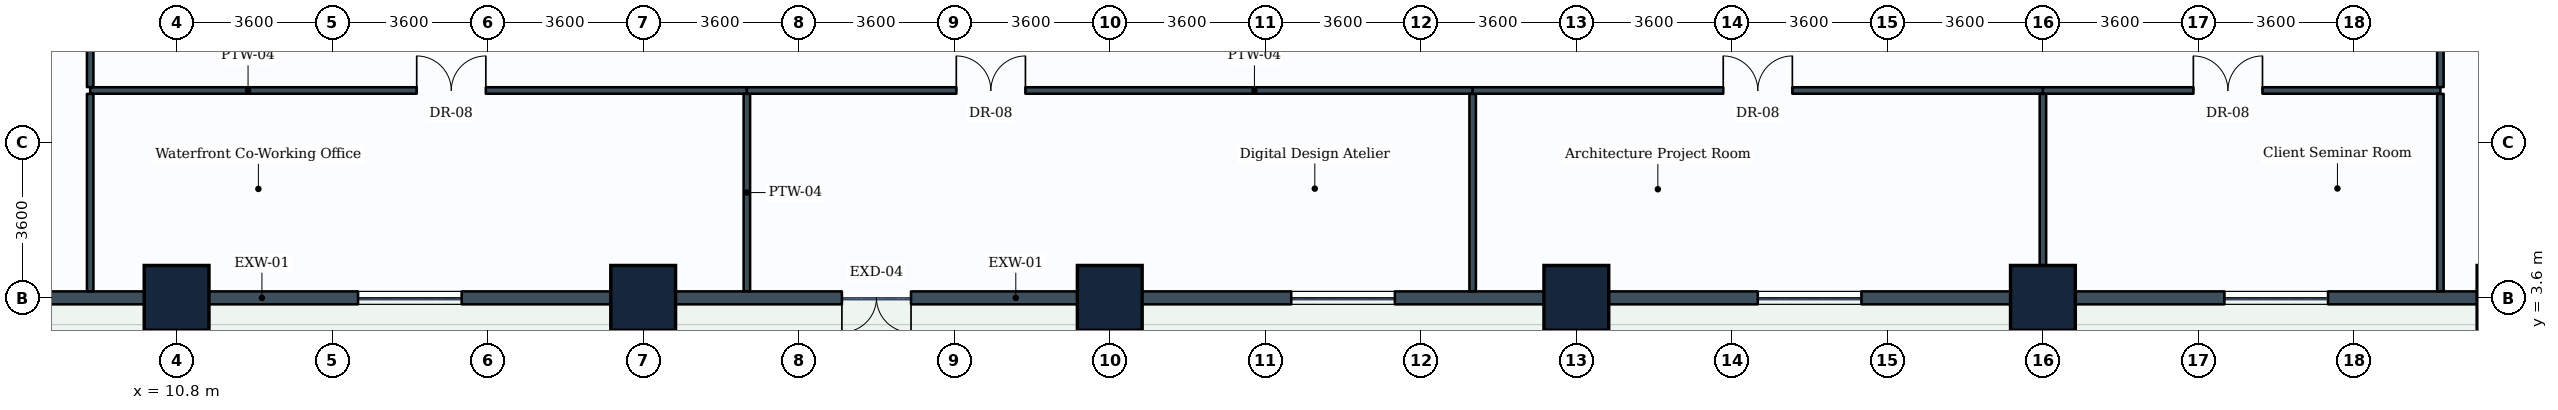
"""IFC4 building model, lengths in metres.
Left out: names, types, materials, properties, quantities, classifications, styles, units other than length and angle.
Written with IfcOpenShell. Run it as: python <this file> out.ifc"""

import sys

from ifc_helpers import new_model, si_unit, direction, frame, frame_2d, origin, origin_2d, place, context, subcontext, project, spatial, rectangle, extrude, element, fill, save


model = new_model("IFC4")
c1 = context("Model", 3, precision=1e-05, world=origin(), true_north=direction((0.0, 1.0)))
c2 = subcontext(c1, "Body", "Model", "MODEL_VIEW")
j1 = project(units=[si_unit("LENGTHUNIT", "METRE"), si_unit("PLANEANGLEUNIT", "RADIAN")], contexts=[c1])
p1 = place(None, origin())
s1 = spatial("IfcSite", under=j1, at=p1, CompositionType="ELEMENT")
p2 = place(p1, origin())
s2 = spatial("IfcBuilding", under=s1, at=p2, CompositionType="ELEMENT")
p3 = place(p2, frame((0.0, 0.0, 14.8)))
s3 = spatial("IfcBuildingStorey", under=s2, at=p3, CompositionType="ELEMENT", Elevation=14.8)
for number, where, z_axis, x_axis in (
    (1, (10.8, 3.6, 0.0), (0.0, 0.0, 1.0), (1.0, 0.0, 0.0)),
    (2, (21.6, 3.6, 0.0), (0.0, 0.0, 1.0), (1.0, 0.0, 0.0)),
    (3, (32.4, 3.6, 0.0), (0.0, 0.0, 1.0), (1.0, 0.0, 0.0)),
    (4, (43.2, 3.6, 0.0), (0.0, 0.0, 1.0), (1.0, 0.0, 0.0)),
    (5, (54.0, 3.6, 0.0), (0.0, 0.0, 1.0), (1.0, 0.0, 0.0)),
    (6, (64.8, 3.6, 0.0), (0.0, 0.0, 1.0), (1.0, 0.0, 0.0)),
):
    element("IfcColumn", number, at=place(p3, frame(where, z_axis=z_axis, x_axis=x_axis)), inside=s3, PredefinedType="COLUMN", context=c2, shape_type="SweptSolid", body=[
        extrude(rectangle(XDim=1.5, YDim=1.5, at=origin_2d()), origin(), (0.0, 0.0, 1.0), 4.6),
    ])
p4 = place(p3, frame((10.8, 3.6, 0.0), z_axis=(0.0, 0.0, 1.0), x_axis=(-1.0, 0.0, 0.0)))
e7 = element("IfcWall", 7, at=p4, inside=s3, PredefinedType="STANDARD", context=c2, shape_type="SweptSolid", body=[
    extrude(rectangle(XDim=10.8, YDim=0.3, at=frame_2d((5.4, 0.0))), origin(), (0.0, 0.0, 1.0), 3.63),
])
p5 = place(p4, frame((4.2, 0.0, 0.85)))
e8 = element("IfcOpeningElement", 8, at=p5, cuts=e7, PredefinedType="OPENING", context=c2, shape_type="SweptSolid", body=[
    extrude(rectangle(XDim=2.4, YDim=1.6, at=frame_2d((1.2, 0.8))), frame((0.0, 0.16, 0.0), z_axis=(0.0, -1.0, 0.0), x_axis=(1.0, 0.0, 0.0)), (0.0, 0.0, 1.0), 0.32),
])
p6 = place(p3, frame((21.6, 3.6, 0.0), z_axis=(0.0, 0.0, 1.0), x_axis=(-1.0, 0.0, 0.0)))
e9 = element("IfcWall", 9, at=p6, inside=s3, PredefinedType="STANDARD", context=c2, shape_type="SweptSolid", body=[
    extrude(rectangle(XDim=10.8, YDim=0.3, at=frame_2d((5.4, 0.0))), origin(), (0.0, 0.0, 1.0), 3.63),
])
p7 = place(p6, frame((4.2, 0.0, 0.85)))
e10 = element("IfcOpeningElement", 10, at=p7, cuts=e9, PredefinedType="OPENING", context=c2, shape_type="SweptSolid", body=[
    extrude(rectangle(XDim=2.4, YDim=1.6, at=frame_2d((1.2, 0.8))), frame((0.0, 0.16, 0.0), z_axis=(0.0, -1.0, 0.0), x_axis=(1.0, 0.0, 0.0)), (0.0, 0.0, 1.0), 0.32),
])
p8 = place(p3, frame((32.4, 3.6, 0.0), z_axis=(0.0, 0.0, 1.0), x_axis=(-1.0, 0.0, 0.0)))
e11 = element("IfcWall", 11, at=p8, inside=s3, PredefinedType="STANDARD", context=c2, shape_type="SweptSolid", body=[
    extrude(rectangle(XDim=10.8, YDim=0.3, at=frame_2d((5.4, 0.0))), origin(), (0.0, 0.0, 1.0), 3.63),
])
p9 = place(p8, frame((4.6, 0.0, 0.0)))
e12 = element("IfcOpeningElement", 12, at=p9, cuts=e11, PredefinedType="OPENING", context=c2, shape_type="SweptSolid", body=[
    extrude(rectangle(XDim=1.6, YDim=2.1, at=frame_2d((0.8, 1.05))), frame((0.0, 0.16, 0.0), z_axis=(0.0, -1.0, 0.0), x_axis=(1.0, 0.0, 0.0)), (0.0, 0.0, 1.0), 0.32),
])
p10 = place(p3, frame((43.2, 3.6, 0.0), z_axis=(0.0, 0.0, 1.0), x_axis=(-1.0, 0.0, 0.0)))
e13 = element("IfcWall", 13, at=p10, inside=s3, PredefinedType="STANDARD", context=c2, shape_type="SweptSolid", body=[
    extrude(rectangle(XDim=10.8, YDim=0.3, at=frame_2d((5.4, 0.0))), origin(), (0.0, 0.0, 1.0), 3.63),
])
p11 = place(p10, frame((4.2, 0.0, 0.85)))
e14 = element("IfcOpeningElement", 14, at=p11, cuts=e13, PredefinedType="OPENING", context=c2, shape_type="SweptSolid", body=[
    extrude(rectangle(XDim=2.4, YDim=1.6, at=frame_2d((1.2, 0.8))), frame((0.0, 0.16, 0.0), z_axis=(0.0, -1.0, 0.0), x_axis=(1.0, 0.0, 0.0)), (0.0, 0.0, 1.0), 0.32),
])
p12 = place(p3, frame((54.0, 3.6, 0.0), z_axis=(0.0, 0.0, 1.0), x_axis=(-1.0, 0.0, 0.0)))
e15 = element("IfcWall", 15, at=p12, inside=s3, PredefinedType="STANDARD", context=c2, shape_type="SweptSolid", body=[
    extrude(rectangle(XDim=10.8, YDim=0.3, at=frame_2d((5.4, 0.0))), origin(), (0.0, 0.0, 1.0), 3.63),
])
p13 = place(p12, frame((4.2, 0.0, 0.85)))
e16 = element("IfcOpeningElement", 16, at=p13, cuts=e15, PredefinedType="OPENING", context=c2, shape_type="SweptSolid", body=[
    extrude(rectangle(XDim=2.4, YDim=1.6, at=frame_2d((1.2, 0.8))), frame((0.0, 0.16, 0.0), z_axis=(0.0, -1.0, 0.0), x_axis=(1.0, 0.0, 0.0)), (0.0, 0.0, 1.0), 0.32),
])
p14 = place(p3, frame((64.8, 3.6, 0.0), z_axis=(0.0, 0.0, 1.0), x_axis=(-1.0, 0.0, 0.0)))
e17 = element("IfcWall", 17, at=p14, inside=s3, PredefinedType="STANDARD", context=c2, shape_type="SweptSolid", body=[
    extrude(rectangle(XDim=10.8, YDim=0.3, at=frame_2d((5.4, 0.0))), origin(), (0.0, 0.0, 1.0), 3.63),
])
p15 = place(p14, frame((4.2, 0.0, 0.85)))
e18 = element("IfcOpeningElement", 18, at=p15, cuts=e17, PredefinedType="OPENING", context=c2, shape_type="SweptSolid", body=[
    extrude(rectangle(XDim=2.4, YDim=1.6, at=frame_2d((1.2, 0.8))), frame((0.0, 0.16, 0.0), z_axis=(0.0, -1.0, 0.0), x_axis=(1.0, 0.0, 0.0)), (0.0, 0.0, 1.0), 0.32),
])
p16 = place(p3, frame((8.8, 8.4, 0.0), z_axis=(0.0, 0.0, 1.0), x_axis=(1.0, 0.0, 0.0)))
e19 = element("IfcWall", 19, at=p16, inside=s3, PredefinedType="PARTITIONING", context=c2, shape_type="SweptSolid", body=[
    extrude(rectangle(XDim=15.2, YDim=0.15, at=frame_2d((7.6, 0.0))), origin(), (0.0, 0.0, 1.0), 3.63),
])
p17 = place(p16, frame((7.558, 0.0, 0.0)))
e20 = element("IfcOpeningElement", 20, at=p17, cuts=e19, PredefinedType="OPENING", context=c2, shape_type="SweptSolid", body=[
    extrude(rectangle(XDim=1.6, YDim=2.2, at=frame_2d((0.8, 1.1))), frame((0.0, 0.085, 0.0), z_axis=(0.0, -1.0, 0.0), x_axis=(1.0, 0.0, 0.0)), (0.0, 0.0, 1.0), 0.17),
])
p18 = place(p3, frame((24.0, 3.754, 0.0), z_axis=(0.0, 0.0, 1.0), x_axis=(0.0, 1.0, 0.0)))
e21 = element("IfcWall", 21, at=p18, inside=s3, PredefinedType="PARTITIONING", context=c2, shape_type="SweptSolid", body=[
    extrude(rectangle(XDim=4.567, YDim=0.15, at=frame_2d((2.284, 0.0))), origin(), (0.0, 0.0, 1.0), 4.285),
])
p19 = place(p3, frame((24.0, 8.4, 0.0), z_axis=(0.0, 0.0, 1.0), x_axis=(1.0, 0.0, 0.0)))
e22 = element("IfcWall", 22, at=p19, inside=s3, PredefinedType="PARTITIONING", context=c2, shape_type="SweptSolid", body=[
    extrude(rectangle(XDim=16.8, YDim=0.15, at=frame_2d((8.4, 0.0))), origin(), (0.0, 0.0, 1.0), 3.63),
])
p20 = place(p19, frame((4.848, 0.0, 0.0)))
e23 = element("IfcOpeningElement", 23, at=p20, cuts=e22, PredefinedType="OPENING", context=c2, shape_type="SweptSolid", body=[
    extrude(rectangle(XDim=1.6, YDim=2.2, at=frame_2d((0.8, 1.1))), frame((0.0, 0.085, 0.0), z_axis=(0.0, -1.0, 0.0), x_axis=(1.0, 0.0, 0.0)), (0.0, 0.0, 1.0), 0.17),
])
p21 = place(p3, frame((40.8, 3.754, 0.0), z_axis=(0.0, 0.0, 1.0), x_axis=(0.0, 1.0, 0.0)))
e24 = element("IfcWall", 24, at=p21, inside=s3, PredefinedType="PARTITIONING", context=c2, shape_type="SweptSolid", body=[
    extrude(rectangle(XDim=4.567, YDim=0.15, at=frame_2d((2.284, 0.0))), origin(), (0.0, 0.0, 1.0), 4.285),
])
p22 = place(p3, frame((40.8, 8.4, 0.0), z_axis=(0.0, 0.0, 1.0), x_axis=(1.0, 0.0, 0.0)))
e25 = element("IfcWall", 25, at=p22, inside=s3, PredefinedType="PARTITIONING", context=c2, shape_type="SweptSolid", body=[
    extrude(rectangle(XDim=13.2, YDim=0.15, at=frame_2d((6.6, 0.0))), origin(), (0.0, 0.0, 1.0), 3.63),
])
p23 = place(p22, frame((5.8, 0.0, 0.0)))
e26 = element("IfcOpeningElement", 26, at=p23, cuts=e25, PredefinedType="OPENING", context=c2, shape_type="SweptSolid", body=[
    extrude(rectangle(XDim=1.6, YDim=2.2, at=frame_2d((0.8, 1.1))), frame((0.0, 0.085, 0.0), z_axis=(0.0, -1.0, 0.0), x_axis=(1.0, 0.0, 0.0)), (0.0, 0.0, 1.0), 0.17),
])
p24 = place(p3, frame((54.0, 3.754, 0.0), z_axis=(0.0, 0.0, 1.0), x_axis=(0.0, 1.0, 0.0)))
e27 = element("IfcWall", 27, at=p24, inside=s3, PredefinedType="PARTITIONING", context=c2, shape_type="SweptSolid", body=[
    extrude(rectangle(XDim=4.567, YDim=0.15, at=frame_2d((2.284, 0.0))), origin(), (0.0, 0.0, 1.0), 3.63),
])
p25 = place(p3, frame((54.0, 8.4, 0.0), z_axis=(0.0, 0.0, 1.0), x_axis=(1.0, 0.0, 0.0)))
e28 = element("IfcWall", 28, at=p25, inside=s3, PredefinedType="PARTITIONING", context=c2, shape_type="SweptSolid", body=[
    extrude(rectangle(XDim=9.2, YDim=0.15, at=frame_2d((4.6, 0.0))), origin(), (0.0, 0.0, 1.0), 3.63),
])
p26 = place(p25, frame((3.482, 0.0, 0.0)))
e29 = element("IfcOpeningElement", 29, at=p26, cuts=e28, PredefinedType="OPENING", context=c2, shape_type="SweptSolid", body=[
    extrude(rectangle(XDim=1.6, YDim=2.2, at=frame_2d((0.8, 1.1))), frame((0.0, 0.085, 0.0), z_axis=(0.0, -1.0, 0.0), x_axis=(1.0, 0.0, 0.0)), (0.0, 0.0, 1.0), 0.17),
])
p27 = place(p3, frame((8.8, 3.754, 0.0), z_axis=(0.0, 0.0, 1.0), x_axis=(0.0, 1.0, 0.0)))
e30 = element("IfcWall", 30, at=p27, inside=s3, PredefinedType="PARTITIONING", context=c2, shape_type="SweptSolid", body=[
    extrude(rectangle(XDim=4.567, YDim=0.15, at=frame_2d((2.284, 0.0))), origin(), (0.0, 0.0, 1.0), 4.285),
])
p28 = place(p3, frame((8.8, 8.479, 0.0), z_axis=(0.0, 0.0, 1.0), x_axis=(0.0, 1.0, 0.0)))
e31 = element("IfcWall", 31, at=p28, inside=s3, PredefinedType="PARTITIONING", context=c2, shape_type="SweptSolid", body=[
    extrude(rectangle(XDim=8.921, YDim=0.15, at=frame_2d((4.46, 0.0))), origin(), (0.0, 0.0, 1.0), 3.63),
])
p29 = place(p28, frame((5.075, 0.0, 0.0)))
e32 = element("IfcOpeningElement", 32, at=p29, cuts=e31, PredefinedType="OPENING", context=c2, shape_type="SweptSolid", body=[
    extrude(rectangle(XDim=1.0, YDim=2.1, at=frame_2d((0.5, 1.05))), frame((0.0, 0.085, 0.0), z_axis=(0.0, -1.0, 0.0), x_axis=(1.0, 0.0, 0.0)), (0.0, 0.0, 1.0), 0.17),
])
p30 = place(p3, frame((63.2, 3.754, 0.0), z_axis=(0.0, 0.0, 1.0), x_axis=(0.0, 1.0, 0.0)))
e33 = element("IfcWall", 33, at=p30, inside=s3, PredefinedType="PARTITIONING", context=c2, shape_type="SweptSolid", body=[
    extrude(rectangle(XDim=4.567, YDim=0.15, at=frame_2d((2.284, 0.0))), origin(), (0.0, 0.0, 1.0), 4.285),
])
p31 = place(p3, frame((63.2, 8.479, 0.0), z_axis=(0.0, 0.0, 1.0), x_axis=(0.0, 1.0, 0.0)))
e34 = element("IfcWall", 34, at=p31, inside=s3, PredefinedType="PARTITIONING", context=c2, shape_type="SweptSolid", body=[
    extrude(rectangle(XDim=7.721, YDim=0.15, at=frame_2d((3.86, 0.0))), origin(), (0.0, 0.0, 1.0), 3.63),
])
p32 = place(p31, frame((4.941, 0.0, 0.0)))
e35 = element("IfcOpeningElement", 35, at=p32, cuts=e34, PredefinedType="OPENING", context=c2, shape_type="SweptSolid", body=[
    extrude(rectangle(XDim=1.6, YDim=2.2, at=frame_2d((0.8, 1.1))), frame((0.0, 0.085, 0.0), z_axis=(0.0, -1.0, 0.0), x_axis=(1.0, 0.0, 0.0)), (0.0, 0.0, 1.0), 0.17),
])
p33 = place(p7, origin())
e36 = element("IfcWindow", 36, at=p33, inside=s3, PartitioningType="SINGLE_PANEL", PredefinedType="WINDOW", context=c2, shape_type="SweptSolid", body=[
    extrude(rectangle(XDim=2.4, YDim=1.6, at=frame_2d((1.2, 0.8))), frame((0.0, 0.03, 0.0), z_axis=(0.0, -1.0, 0.0), x_axis=(1.0, 0.0, 0.0)), (0.0, 0.0, 1.0), 0.06),
])
fill(e10, e36)
p34 = place(p9, origin())
e37 = element("IfcDoor", 37, at=p34, inside=s3, OperationType="SINGLE_SWING_LEFT", PredefinedType="DOOR", context=c2, shape_type="SweptSolid", body=[
    extrude(rectangle(XDim=1.6, YDim=2.1, at=frame_2d((0.8, 1.05))), frame((0.0, 0.025, 0.0), z_axis=(0.0, -1.0, 0.0), x_axis=(1.0, 0.0, 0.0)), (0.0, 0.0, 1.0), 0.05),
])
fill(e12, e37)
p35 = place(p11, origin())
e38 = element("IfcWindow", 38, at=p35, inside=s3, PartitioningType="SINGLE_PANEL", PredefinedType="WINDOW", context=c2, shape_type="SweptSolid", body=[
    extrude(rectangle(XDim=2.4, YDim=1.6, at=frame_2d((1.2, 0.8))), frame((0.0, 0.03, 0.0), z_axis=(0.0, -1.0, 0.0), x_axis=(1.0, 0.0, 0.0)), (0.0, 0.0, 1.0), 0.06),
])
fill(e14, e38)
p36 = place(p13, origin())
e39 = element("IfcWindow", 39, at=p36, inside=s3, PartitioningType="SINGLE_PANEL", PredefinedType="WINDOW", context=c2, shape_type="SweptSolid", body=[
    extrude(rectangle(XDim=2.4, YDim=1.6, at=frame_2d((1.2, 0.8))), frame((0.0, 0.03, 0.0), z_axis=(0.0, -1.0, 0.0), x_axis=(1.0, 0.0, 0.0)), (0.0, 0.0, 1.0), 0.06),
])
fill(e16, e39)
p37 = place(p15, origin())
e40 = element("IfcWindow", 40, at=p37, inside=s3, PartitioningType="SINGLE_PANEL", PredefinedType="WINDOW", context=c2, shape_type="SweptSolid", body=[
    extrude(rectangle(XDim=2.4, YDim=1.6, at=frame_2d((1.2, 0.8))), frame((0.0, 0.03, 0.0), z_axis=(0.0, -1.0, 0.0), x_axis=(1.0, 0.0, 0.0)), (0.0, 0.0, 1.0), 0.06),
])
fill(e18, e40)
p38 = place(p17, origin())
e41 = element("IfcDoor", 41, at=p38, inside=s3, OperationType="DOUBLE_DOOR_SINGLE_SWING", PredefinedType="DOOR", context=c2, shape_type="SweptSolid", body=[
    extrude(rectangle(XDim=1.6, YDim=2.2, at=frame_2d((0.8, 1.1))), frame((0.0, 0.025, 0.0), z_axis=(0.0, -1.0, 0.0), x_axis=(1.0, 0.0, 0.0)), (0.0, 0.0, 1.0), 0.05),
])
fill(e20, e41)
p39 = place(p20, origin())
e42 = element("IfcDoor", 42, at=p39, inside=s3, OperationType="DOUBLE_DOOR_SINGLE_SWING", PredefinedType="DOOR", context=c2, shape_type="SweptSolid", body=[
    extrude(rectangle(XDim=1.6, YDim=2.2, at=frame_2d((0.8, 1.1))), frame((0.0, 0.025, 0.0), z_axis=(0.0, -1.0, 0.0), x_axis=(1.0, 0.0, 0.0)), (0.0, 0.0, 1.0), 0.05),
])
fill(e23, e42)
p40 = place(p23, origin())
e43 = element("IfcDoor", 43, at=p40, inside=s3, OperationType="DOUBLE_DOOR_SINGLE_SWING", PredefinedType="DOOR", context=c2, shape_type="SweptSolid", body=[
    extrude(rectangle(XDim=1.6, YDim=2.2, at=frame_2d((0.8, 1.1))), frame((0.0, 0.025, 0.0), z_axis=(0.0, -1.0, 0.0), x_axis=(1.0, 0.0, 0.0)), (0.0, 0.0, 1.0), 0.05),
])
fill(e26, e43)
p41 = place(p26, origin())
e44 = element("IfcDoor", 44, at=p41, inside=s3, OperationType="DOUBLE_DOOR_SINGLE_SWING", PredefinedType="DOOR", context=c2, shape_type="SweptSolid", body=[
    extrude(rectangle(XDim=1.6, YDim=2.2, at=frame_2d((0.8, 1.1))), frame((0.0, 0.025, 0.0), z_axis=(0.0, -1.0, 0.0), x_axis=(1.0, 0.0, 0.0)), (0.0, 0.0, 1.0), 0.05),
])
fill(e29, e44)
save(model, sys.argv[1])
